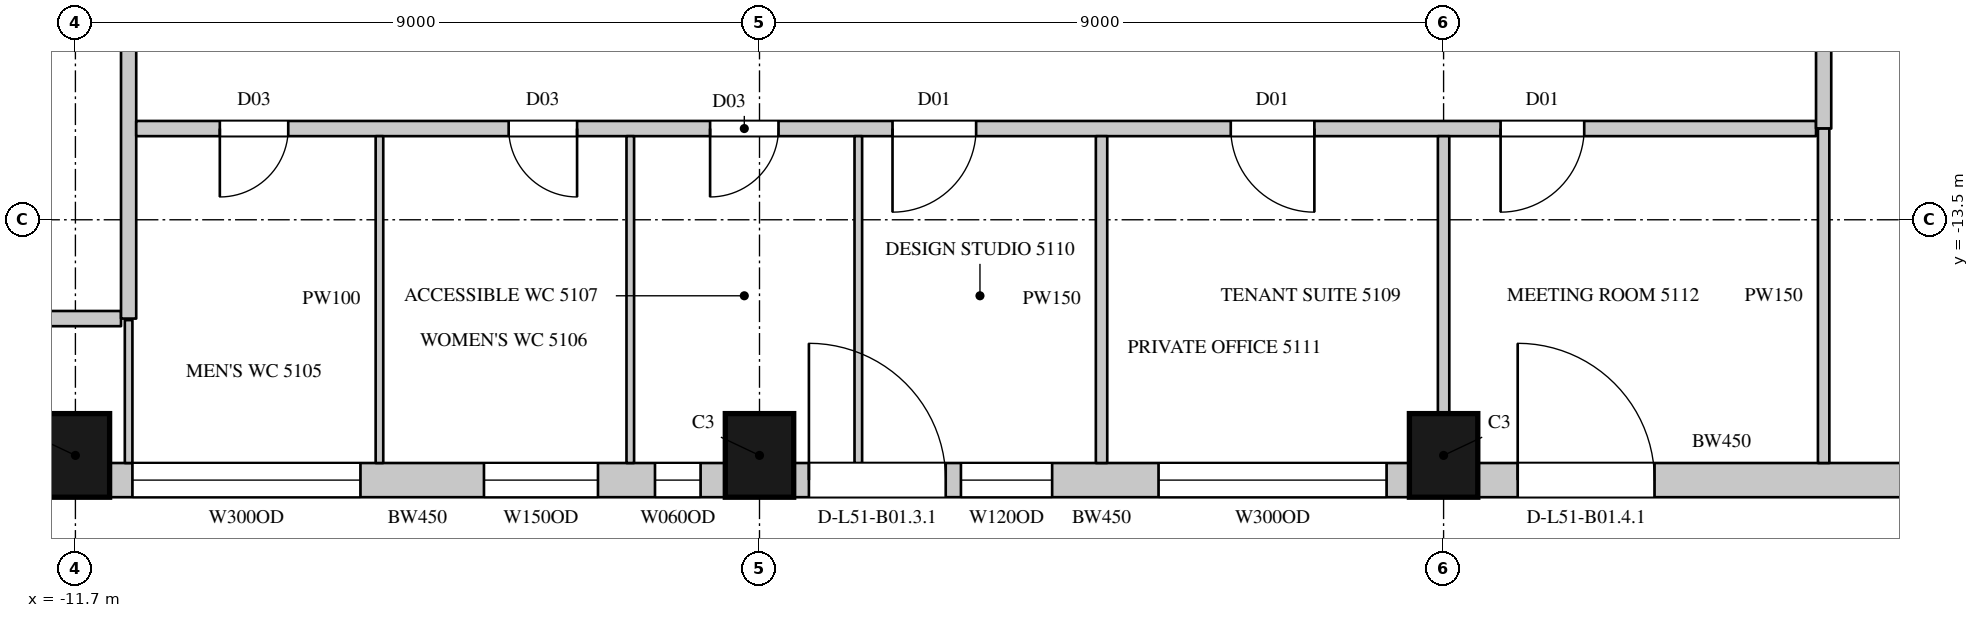
"""IFC4 building model, lengths in metres.
Left out: names, types, materials, properties, quantities, classifications, styles, units other than length and angle.
Written with IfcOpenShell. Run it as: python <this file> out.ifc"""

import sys

from ifc_helpers import new_model, si_unit, direction, frame, frame_2d, origin, origin_2d, place, context, subcontext, project, spatial, rectangle, extrude, element, fill, save


model = new_model("IFC4")
c1 = context("Model", 3, precision=1e-05, world=origin(), true_north=direction((0.0, 1.0)))
c2 = subcontext(c1, "Body", "Model", "MODEL_VIEW")
j1 = project(units=[si_unit("LENGTHUNIT", "METRE"), si_unit("PLANEANGLEUNIT", "RADIAN")], contexts=[c1])
p1 = place(None, origin())
s1 = spatial("IfcSite", under=j1, at=p1, CompositionType="ELEMENT")
p2 = place(p1, origin())
s2 = spatial("IfcBuilding", under=s1, at=p2, CompositionType="ELEMENT")
p3 = place(p2, frame((0.0, 0.0, 230.2)))
s3 = spatial("IfcBuildingStorey", under=s2, at=p3, CompositionType="ELEMENT", Elevation=230.2)
for number, where, z_axis, x_axis in (
    (1, (-11.7, -16.6, 0.0), (0.0, 0.0, 1.0), (1.0, 0.0, 0.0)),
    (2, (-2.7, -16.6, 0.0), (0.0, 0.0, 1.0), (1.0, 0.0, 0.0)),
    (3, (6.3, -16.6, 0.0), (0.0, 0.0, 1.0), (1.0, 0.0, 0.0)),
):
    element("IfcColumn", number, at=place(p3, frame(where, z_axis=z_axis, x_axis=x_axis)), inside=s3, PredefinedType="COLUMN", context=c2, shape_type="SweptSolid", body=[
        extrude(rectangle(XDim=0.9, YDim=1.1, at=origin_2d()), origin(), (0.0, 0.0, 1.0), 4.1),
    ])
p4 = place(p3, frame((-11.25, -16.925, 0.0), z_axis=(0.0, 0.0, 1.0), x_axis=(1.0, 0.0, 0.0)))
e4 = element("IfcWall", 4, at=p4, inside=s3, PredefinedType="SOLIDWALL", context=c2, shape_type="SweptSolid", body=[
    extrude(rectangle(XDim=8.1, YDim=0.45, at=frame_2d((4.05, 0.0))), origin(), (0.0, 0.0, 1.0), 3.8),
])
p5 = place(p4, frame((0.3, 0.0, 1.05)))
e5 = element("IfcOpeningElement", 5, at=p5, cuts=e4, PredefinedType="OPENING", context=c2, shape_type="SweptSolid", body=[
    extrude(rectangle(XDim=3.0, YDim=2.4, at=frame_2d((1.5, 1.2))), frame((0.0, 0.235, 0.0), z_axis=(0.0, -1.0, 0.0), x_axis=(1.0, 0.0, 0.0)), (0.0, 0.0, 1.0), 0.47),
])
p6 = place(p4, frame((4.925, 0.0, 1.05)))
e6 = element("IfcOpeningElement", 6, at=p6, cuts=e4, PredefinedType="OPENING", context=c2, shape_type="SweptSolid", body=[
    extrude(rectangle(XDim=1.5, YDim=2.4, at=frame_2d((0.75, 1.2))), frame((0.0, 0.235, 0.0), z_axis=(0.0, -1.0, 0.0), x_axis=(1.0, 0.0, 0.0)), (0.0, 0.0, 1.0), 0.47),
])
p7 = place(p4, frame((7.175, 0.0, 1.05)))
e7 = element("IfcOpeningElement", 7, at=p7, cuts=e4, PredefinedType="OPENING", context=c2, shape_type="SweptSolid", body=[
    extrude(rectangle(XDim=0.6, YDim=2.4, at=frame_2d((0.3, 1.2))), frame((0.0, 0.235, 0.0), z_axis=(0.0, -1.0, 0.0), x_axis=(1.0, 0.0, 0.0)), (0.0, 0.0, 1.0), 0.47),
])
p8 = place(p3, frame((-2.25, -16.925, 0.0), z_axis=(0.0, 0.0, 1.0), x_axis=(1.0, 0.0, 0.0)))
e8 = element("IfcWall", 8, at=p8, inside=s3, PredefinedType="SOLIDWALL", context=c2, shape_type="SweptSolid", body=[
    extrude(rectangle(XDim=8.1, YDim=0.45, at=frame_2d((4.05, 0.0))), origin(), (0.0, 0.0, 1.0), 3.8),
])
p9 = place(p8, frame((0.2, 0.0, 0.0)))
e9 = element("IfcOpeningElement", 9, at=p9, cuts=e8, PredefinedType="OPENING", context=c2, shape_type="SweptSolid", body=[
    extrude(rectangle(XDim=1.8, YDim=2.4, at=frame_2d((0.9, 1.2))), frame((0.0, 0.235, 0.0), z_axis=(0.0, -1.0, 0.0), x_axis=(1.0, 0.0, 0.0)), (0.0, 0.0, 1.0), 0.47),
])
p10 = place(p8, frame((2.2, 0.0, 1.05)))
e10 = element("IfcOpeningElement", 10, at=p10, cuts=e8, PredefinedType="OPENING", context=c2, shape_type="SweptSolid", body=[
    extrude(rectangle(XDim=1.2, YDim=2.4, at=frame_2d((0.6, 1.2))), frame((0.0, 0.235, 0.0), z_axis=(0.0, -1.0, 0.0), x_axis=(1.0, 0.0, 0.0)), (0.0, 0.0, 1.0), 0.47),
])
p11 = place(p8, frame((4.8, 0.0, 1.05)))
e11 = element("IfcOpeningElement", 11, at=p11, cuts=e8, PredefinedType="OPENING", context=c2, shape_type="SweptSolid", body=[
    extrude(rectangle(XDim=3.0, YDim=2.4, at=frame_2d((1.5, 1.2))), frame((0.0, 0.235, 0.0), z_axis=(0.0, -1.0, 0.0), x_axis=(1.0, 0.0, 0.0)), (0.0, 0.0, 1.0), 0.47),
])
p12 = place(p3, frame((6.75, -16.925, 0.0), z_axis=(0.0, 0.0, 1.0), x_axis=(1.0, 0.0, 0.0)))
e12 = element("IfcWall", 12, at=p12, inside=s3, PredefinedType="SOLIDWALL", context=c2, shape_type="SweptSolid", body=[
    extrude(rectangle(XDim=6.414, YDim=0.45, at=frame_2d((3.207, 0.0))), origin(), (0.0, 0.0, 1.0), 3.8),
])
p13 = place(p12, frame((0.525, 0.0, 0.0)))
e13 = element("IfcOpeningElement", 13, at=p13, cuts=e12, PredefinedType="OPENING", context=c2, shape_type="SweptSolid", body=[
    extrude(rectangle(XDim=1.8, YDim=2.4, at=frame_2d((0.9, 1.2))), frame((0.0, 0.235, 0.0), z_axis=(0.0, -1.0, 0.0), x_axis=(1.0, 0.0, 0.0)), (0.0, 0.0, 1.0), 0.47),
])
p14 = place(p3, frame((-13.97, -14.8, 0.0), z_axis=(0.0, 0.0, 1.0), x_axis=(1.0, 0.0, 0.0)))
e14 = element("IfcWall", 14, at=p14, inside=s3, PredefinedType="PARTITIONING", context=c2, shape_type="SweptSolid", body=[
    extrude(rectangle(XDim=2.87, YDim=0.2, at=frame_2d((1.435, 0.0))), origin(), (0.0, 0.0, 1.0), 3.8),
])
p15 = place(p3, frame((-11.0, -14.8, 0.0), z_axis=(0.0, 0.0, 1.0), x_axis=(0.0, 1.0, 0.0)))
e15 = element("IfcWall", 15, at=p15, inside=s3, PredefinedType="PARTITIONING", context=c2, shape_type="SweptSolid", body=[
    extrude(rectangle(XDim=29.6, YDim=0.2, at=frame_2d((14.8, 0.0))), origin(), (0.0, 0.0, 1.0), 3.8),
])
p16 = place(p15, frame((10.15, 0.0, 0.0)))
e16 = element("IfcOpeningElement", 16, at=p16, cuts=e15, PredefinedType="OPENING", context=c2, shape_type="SweptSolid", body=[
    extrude(rectangle(XDim=1.5, YDim=2.4, at=frame_2d((0.75, 1.2))), frame((0.0, 0.11, 0.0), z_axis=(0.0, -1.0, 0.0), x_axis=(1.0, 0.0, 0.0)), (0.0, 0.0, 1.0), 0.22),
])
p17 = place(p3, frame((-10.9, -12.3, 0.0), z_axis=(0.0, 0.0, 1.0), x_axis=(1.0, 0.0, 0.0)))
e17 = element("IfcWall", 17, at=p17, inside=s3, PredefinedType="PARTITIONING", context=c2, shape_type="SweptSolid", body=[
    extrude(rectangle(XDim=22.1, YDim=0.2, at=frame_2d((11.05, 0.0))), origin(), (0.0, 0.0, 1.0), 3.8),
])
p18 = place(p17, frame((1.1, 0.0, 0.0)))
e18 = element("IfcOpeningElement", 18, at=p18, cuts=e17, PredefinedType="OPENING", context=c2, shape_type="SweptSolid", body=[
    extrude(rectangle(XDim=0.9, YDim=2.2, at=frame_2d((0.45, 1.1))), frame((0.0, 0.11, 0.0), z_axis=(0.0, -1.0, 0.0), x_axis=(1.0, 0.0, 0.0)), (0.0, 0.0, 1.0), 0.22),
])
p19 = place(p17, frame((4.9, 0.0, 0.0)))
e19 = element("IfcOpeningElement", 19, at=p19, cuts=e17, PredefinedType="OPENING", context=c2, shape_type="SweptSolid", body=[
    extrude(rectangle(XDim=0.9, YDim=2.2, at=frame_2d((0.45, 1.1))), frame((0.0, 0.11, 0.0), z_axis=(0.0, -1.0, 0.0), x_axis=(1.0, 0.0, 0.0)), (0.0, 0.0, 1.0), 0.22),
])
p20 = place(p17, frame((7.55, 0.0, 0.0)))
e20 = element("IfcOpeningElement", 20, at=p20, cuts=e17, PredefinedType="OPENING", context=c2, shape_type="SweptSolid", body=[
    extrude(rectangle(XDim=0.9, YDim=2.2, at=frame_2d((0.45, 1.1))), frame((0.0, 0.11, 0.0), z_axis=(0.0, -1.0, 0.0), x_axis=(1.0, 0.0, 0.0)), (0.0, 0.0, 1.0), 0.22),
])
p21 = place(p17, frame((9.95, 0.0, 0.0)))
e21 = element("IfcOpeningElement", 21, at=p21, cuts=e17, PredefinedType="OPENING", context=c2, shape_type="SweptSolid", body=[
    extrude(rectangle(XDim=1.1, YDim=2.4, at=frame_2d((0.55, 1.2))), frame((0.0, 0.11, 0.0), z_axis=(0.0, -1.0, 0.0), x_axis=(1.0, 0.0, 0.0)), (0.0, 0.0, 1.0), 0.22),
])
p22 = place(p17, frame((14.4, 0.0, 0.0)))
e22 = element("IfcOpeningElement", 22, at=p22, cuts=e17, PredefinedType="OPENING", context=c2, shape_type="SweptSolid", body=[
    extrude(rectangle(XDim=1.1, YDim=2.4, at=frame_2d((0.55, 1.2))), frame((0.0, 0.11, 0.0), z_axis=(0.0, -1.0, 0.0), x_axis=(1.0, 0.0, 0.0)), (0.0, 0.0, 1.0), 0.22),
])
p23 = place(p17, frame((17.95, 0.0, 0.0)))
e23 = element("IfcOpeningElement", 23, at=p23, cuts=e17, PredefinedType="OPENING", context=c2, shape_type="SweptSolid", body=[
    extrude(rectangle(XDim=1.1, YDim=2.4, at=frame_2d((0.55, 1.2))), frame((0.0, 0.11, 0.0), z_axis=(0.0, -1.0, 0.0), x_axis=(1.0, 0.0, 0.0)), (0.0, 0.0, 1.0), 0.22),
])
p24 = place(p3, frame((11.3, -12.3, 0.0), z_axis=(0.0, 0.0, 1.0), x_axis=(0.0, 1.0, 0.0)))
e24 = element("IfcWall", 24, at=p24, inside=s3, PredefinedType="PARTITIONING", context=c2, shape_type="SweptSolid", body=[
    extrude(rectangle(XDim=24.5, YDim=0.2, at=frame_2d((12.25, 0.0))), origin(), (0.0, 0.0, 1.0), 3.8),
])
p25 = place(p24, frame((10.15, 0.0, 0.0)))
e25 = element("IfcOpeningElement", 25, at=p25, cuts=e24, PredefinedType="OPENING", context=c2, shape_type="SweptSolid", body=[
    extrude(rectangle(XDim=1.5, YDim=2.4, at=frame_2d((0.75, 1.2))), frame((0.0, 0.11, 0.0), z_axis=(0.0, -1.0, 0.0), x_axis=(1.0, 0.0, 0.0)), (0.0, 0.0, 1.0), 0.22),
])
p26 = place(p24, frame((3.3, 0.0, 0.0)))
e26 = element("IfcOpeningElement", 26, at=p26, cuts=e24, PredefinedType="OPENING", context=c2, shape_type="SweptSolid", body=[
    extrude(rectangle(XDim=1.1, YDim=2.4, at=frame_2d((0.55, 1.2))), frame((0.0, 0.11, 0.0), z_axis=(0.0, -1.0, 0.0), x_axis=(1.0, 0.0, 0.0)), (0.0, 0.0, 1.0), 0.22),
])
p27 = place(p3, frame((1.8, -16.7, 0.0), z_axis=(0.0, 0.0, 1.0), x_axis=(0.0, 1.0, 0.0)))
e27 = element("IfcWall", 27, at=p27, inside=s3, PredefinedType="PARTITIONING", context=c2, shape_type="SweptSolid", body=[
    extrude(rectangle(XDim=4.3, YDim=0.15, at=frame_2d((2.15, 0.0))), origin(), (0.0, 0.0, 1.0), 3.15),
])
p28 = place(p3, frame((6.3, -16.05, 0.0), z_axis=(0.0, 0.0, 1.0), x_axis=(0.0, 1.0, 0.0)))
e28 = element("IfcWall", 28, at=p28, inside=s3, PredefinedType="PARTITIONING", context=c2, shape_type="SweptSolid", body=[
    extrude(rectangle(XDim=3.65, YDim=0.15, at=frame_2d((1.825, 0.0))), origin(), (0.0, 0.0, 1.0), 3.25),
])
p29 = place(p3, frame((11.3, -16.7, 0.0), z_axis=(0.0, 0.0, 1.0), x_axis=(0.0, 1.0, 0.0)))
e29 = element("IfcWall", 29, at=p29, inside=s3, PredefinedType="PARTITIONING", context=c2, shape_type="SweptSolid", body=[
    extrude(rectangle(XDim=4.4, YDim=0.15, at=frame_2d((2.2, 0.0))), origin(), (0.0, 0.0, 1.0), 3.8),
])
p30 = place(p3, frame((-11.0, -16.7, 0.0), z_axis=(0.0, 0.0, 1.0), x_axis=(0.0, 1.0, 0.0)))
e30 = element("IfcWall", 30, at=p30, inside=s3, PredefinedType="PARTITIONING", context=c2, shape_type="SweptSolid", body=[
    extrude(rectangle(XDim=1.88, YDim=0.1, at=frame_2d((0.94, 0.0))), origin(), (0.0, 0.0, 1.0), 3.8),
])
for number, where, z_axis, x_axis in (
    (31, (-7.7, -16.7, 0.0), (0.0, 0.0, 1.0), (0.0, 1.0, 0.0)),
    (32, (-4.4, -16.7, 0.0), (0.0, 0.0, 1.0), (0.0, 1.0, 0.0)),
    (33, (-1.4, -16.7, 0.0), (0.0, 0.0, 1.0), (0.0, 1.0, 0.0)),
):
    element("IfcWall", number, at=place(p3, frame(where, z_axis=z_axis, x_axis=x_axis)), inside=s3, PredefinedType="PARTITIONING", context=c2, shape_type="SweptSolid", body=[
        extrude(rectangle(XDim=4.3, YDim=0.1, at=frame_2d((2.15, 0.0))), origin(), (0.0, 0.0, 1.0), 3.8),
    ])
p31 = place(p5, origin())
e34 = element("IfcWindow", 34, at=p31, inside=s3, PartitioningType="SINGLE_PANEL", PredefinedType="WINDOW", context=c2, shape_type="SweptSolid", body=[
    extrude(rectangle(XDim=3.0, YDim=2.4, at=frame_2d((1.5, 1.2))), frame((0.0, 0.135, 0.0), z_axis=(0.0, -1.0, 0.0), x_axis=(1.0, 0.0, 0.0)), (0.0, 0.0, 1.0), 0.06),
])
fill(e5, e34)
p32 = place(p9, origin())
e35 = element("IfcDoor", 35, at=p32, inside=s3, OperationType="SLIDING_TO_LEFT", PredefinedType="DOOR", context=c2, shape_type="SweptSolid", body=[
    extrude(rectangle(XDim=1.8, YDim=2.4, at=frame_2d((0.9, 1.2))), frame((0.0, 0.13, 0.0), z_axis=(0.0, -1.0, 0.0), x_axis=(1.0, 0.0, 0.0)), (0.0, 0.0, 1.0), 0.05),
])
fill(e9, e35)
p33 = place(p10, origin())
e36 = element("IfcWindow", 36, at=p33, inside=s3, PartitioningType="SINGLE_PANEL", PredefinedType="WINDOW", context=c2, shape_type="SweptSolid", body=[
    extrude(rectangle(XDim=1.2, YDim=2.4, at=frame_2d((0.6, 1.2))), frame((0.0, 0.135, 0.0), z_axis=(0.0, -1.0, 0.0), x_axis=(1.0, 0.0, 0.0)), (0.0, 0.0, 1.0), 0.06),
])
fill(e10, e36)
p34 = place(p11, origin())
e37 = element("IfcWindow", 37, at=p34, inside=s3, PartitioningType="SINGLE_PANEL", PredefinedType="WINDOW", context=c2, shape_type="SweptSolid", body=[
    extrude(rectangle(XDim=3.0, YDim=2.4, at=frame_2d((1.5, 1.2))), frame((0.0, 0.135, 0.0), z_axis=(0.0, -1.0, 0.0), x_axis=(1.0, 0.0, 0.0)), (0.0, 0.0, 1.0), 0.06),
])
fill(e11, e37)
p35 = place(p13, origin())
e38 = element("IfcDoor", 38, at=p35, inside=s3, OperationType="SLIDING_TO_LEFT", PredefinedType="DOOR", context=c2, shape_type="SweptSolid", body=[
    extrude(rectangle(XDim=1.8, YDim=2.4, at=frame_2d((0.9, 1.2))), frame((0.0, 0.13, 0.0), z_axis=(0.0, -1.0, 0.0), x_axis=(1.0, 0.0, 0.0)), (0.0, 0.0, 1.0), 0.05),
])
fill(e13, e38)
p36 = place(p18, origin())
e39 = element("IfcDoor", 39, at=p36, inside=s3, OperationType="SINGLE_SWING_RIGHT", PredefinedType="DOOR", context=c2, shape_type="SweptSolid", body=[
    extrude(rectangle(XDim=0.9, YDim=2.2, at=frame_2d((0.45, 1.1))), frame((0.0, 0.025, 0.0), z_axis=(0.0, -1.0, 0.0), x_axis=(1.0, 0.0, 0.0)), (0.0, 0.0, 1.0), 0.05),
])
fill(e18, e39)
p37 = place(p19, origin())
e40 = element("IfcDoor", 40, at=p37, inside=s3, OperationType="SINGLE_SWING_LEFT", PredefinedType="DOOR", context=c2, shape_type="SweptSolid", body=[
    extrude(rectangle(XDim=0.9, YDim=2.2, at=frame_2d((0.45, 1.1))), frame((0.0, 0.025, 0.0), z_axis=(0.0, -1.0, 0.0), x_axis=(1.0, 0.0, 0.0)), (0.0, 0.0, 1.0), 0.05),
])
fill(e19, e40)
p38 = place(p20, origin())
e41 = element("IfcDoor", 41, at=p38, inside=s3, OperationType="SINGLE_SWING_RIGHT", PredefinedType="DOOR", context=c2, shape_type="SweptSolid", body=[
    extrude(rectangle(XDim=0.9, YDim=2.2, at=frame_2d((0.45, 1.1))), frame((0.0, 0.025, 0.0), z_axis=(0.0, -1.0, 0.0), x_axis=(1.0, 0.0, 0.0)), (0.0, 0.0, 1.0), 0.05),
])
fill(e20, e41)
p39 = place(p21, origin())
e42 = element("IfcDoor", 42, at=p39, inside=s3, OperationType="SINGLE_SWING_RIGHT", PredefinedType="DOOR", context=c2, shape_type="SweptSolid", body=[
    extrude(rectangle(XDim=1.1, YDim=2.4, at=frame_2d((0.55, 1.2))), frame((0.0, 0.025, 0.0), z_axis=(0.0, -1.0, 0.0), x_axis=(1.0, 0.0, 0.0)), (0.0, 0.0, 1.0), 0.05),
])
fill(e21, e42)
p40 = place(p22, origin())
e43 = element("IfcDoor", 43, at=p40, inside=s3, OperationType="SINGLE_SWING_LEFT", PredefinedType="DOOR", context=c2, shape_type="SweptSolid", body=[
    extrude(rectangle(XDim=1.1, YDim=2.4, at=frame_2d((0.55, 1.2))), frame((0.0, 0.025, 0.0), z_axis=(0.0, -1.0, 0.0), x_axis=(1.0, 0.0, 0.0)), (0.0, 0.0, 1.0), 0.05),
])
fill(e22, e43)
p41 = place(p23, origin())
e44 = element("IfcDoor", 44, at=p41, inside=s3, OperationType="SINGLE_SWING_RIGHT", PredefinedType="DOOR", context=c2, shape_type="SweptSolid", body=[
    extrude(rectangle(XDim=1.1, YDim=2.4, at=frame_2d((0.55, 1.2))), frame((0.0, 0.025, 0.0), z_axis=(0.0, -1.0, 0.0), x_axis=(1.0, 0.0, 0.0)), (0.0, 0.0, 1.0), 0.05),
])
fill(e23, e44)
p42 = place(p6, origin())
e45 = element("IfcWindow", 45, at=p42, inside=s3, PartitioningType="SINGLE_PANEL", PredefinedType="WINDOW", context=c2, shape_type="SweptSolid", body=[
    extrude(rectangle(XDim=1.5, YDim=2.4, at=frame_2d((0.75, 1.2))), frame((0.0, 0.135, 0.0), z_axis=(0.0, -1.0, 0.0), x_axis=(1.0, 0.0, 0.0)), (0.0, 0.0, 1.0), 0.06),
])
fill(e6, e45)
p43 = place(p7, origin())
e46 = element("IfcWindow", 46, at=p43, inside=s3, PartitioningType="SINGLE_PANEL", PredefinedType="WINDOW", context=c2, shape_type="SweptSolid", body=[
    extrude(rectangle(XDim=0.6, YDim=2.4, at=frame_2d((0.3, 1.2))), frame((0.0, 0.135, 0.0), z_axis=(0.0, -1.0, 0.0), x_axis=(1.0, 0.0, 0.0)), (0.0, 0.0, 1.0), 0.06),
])
fill(e7, e46)
save(model, sys.argv[1])
